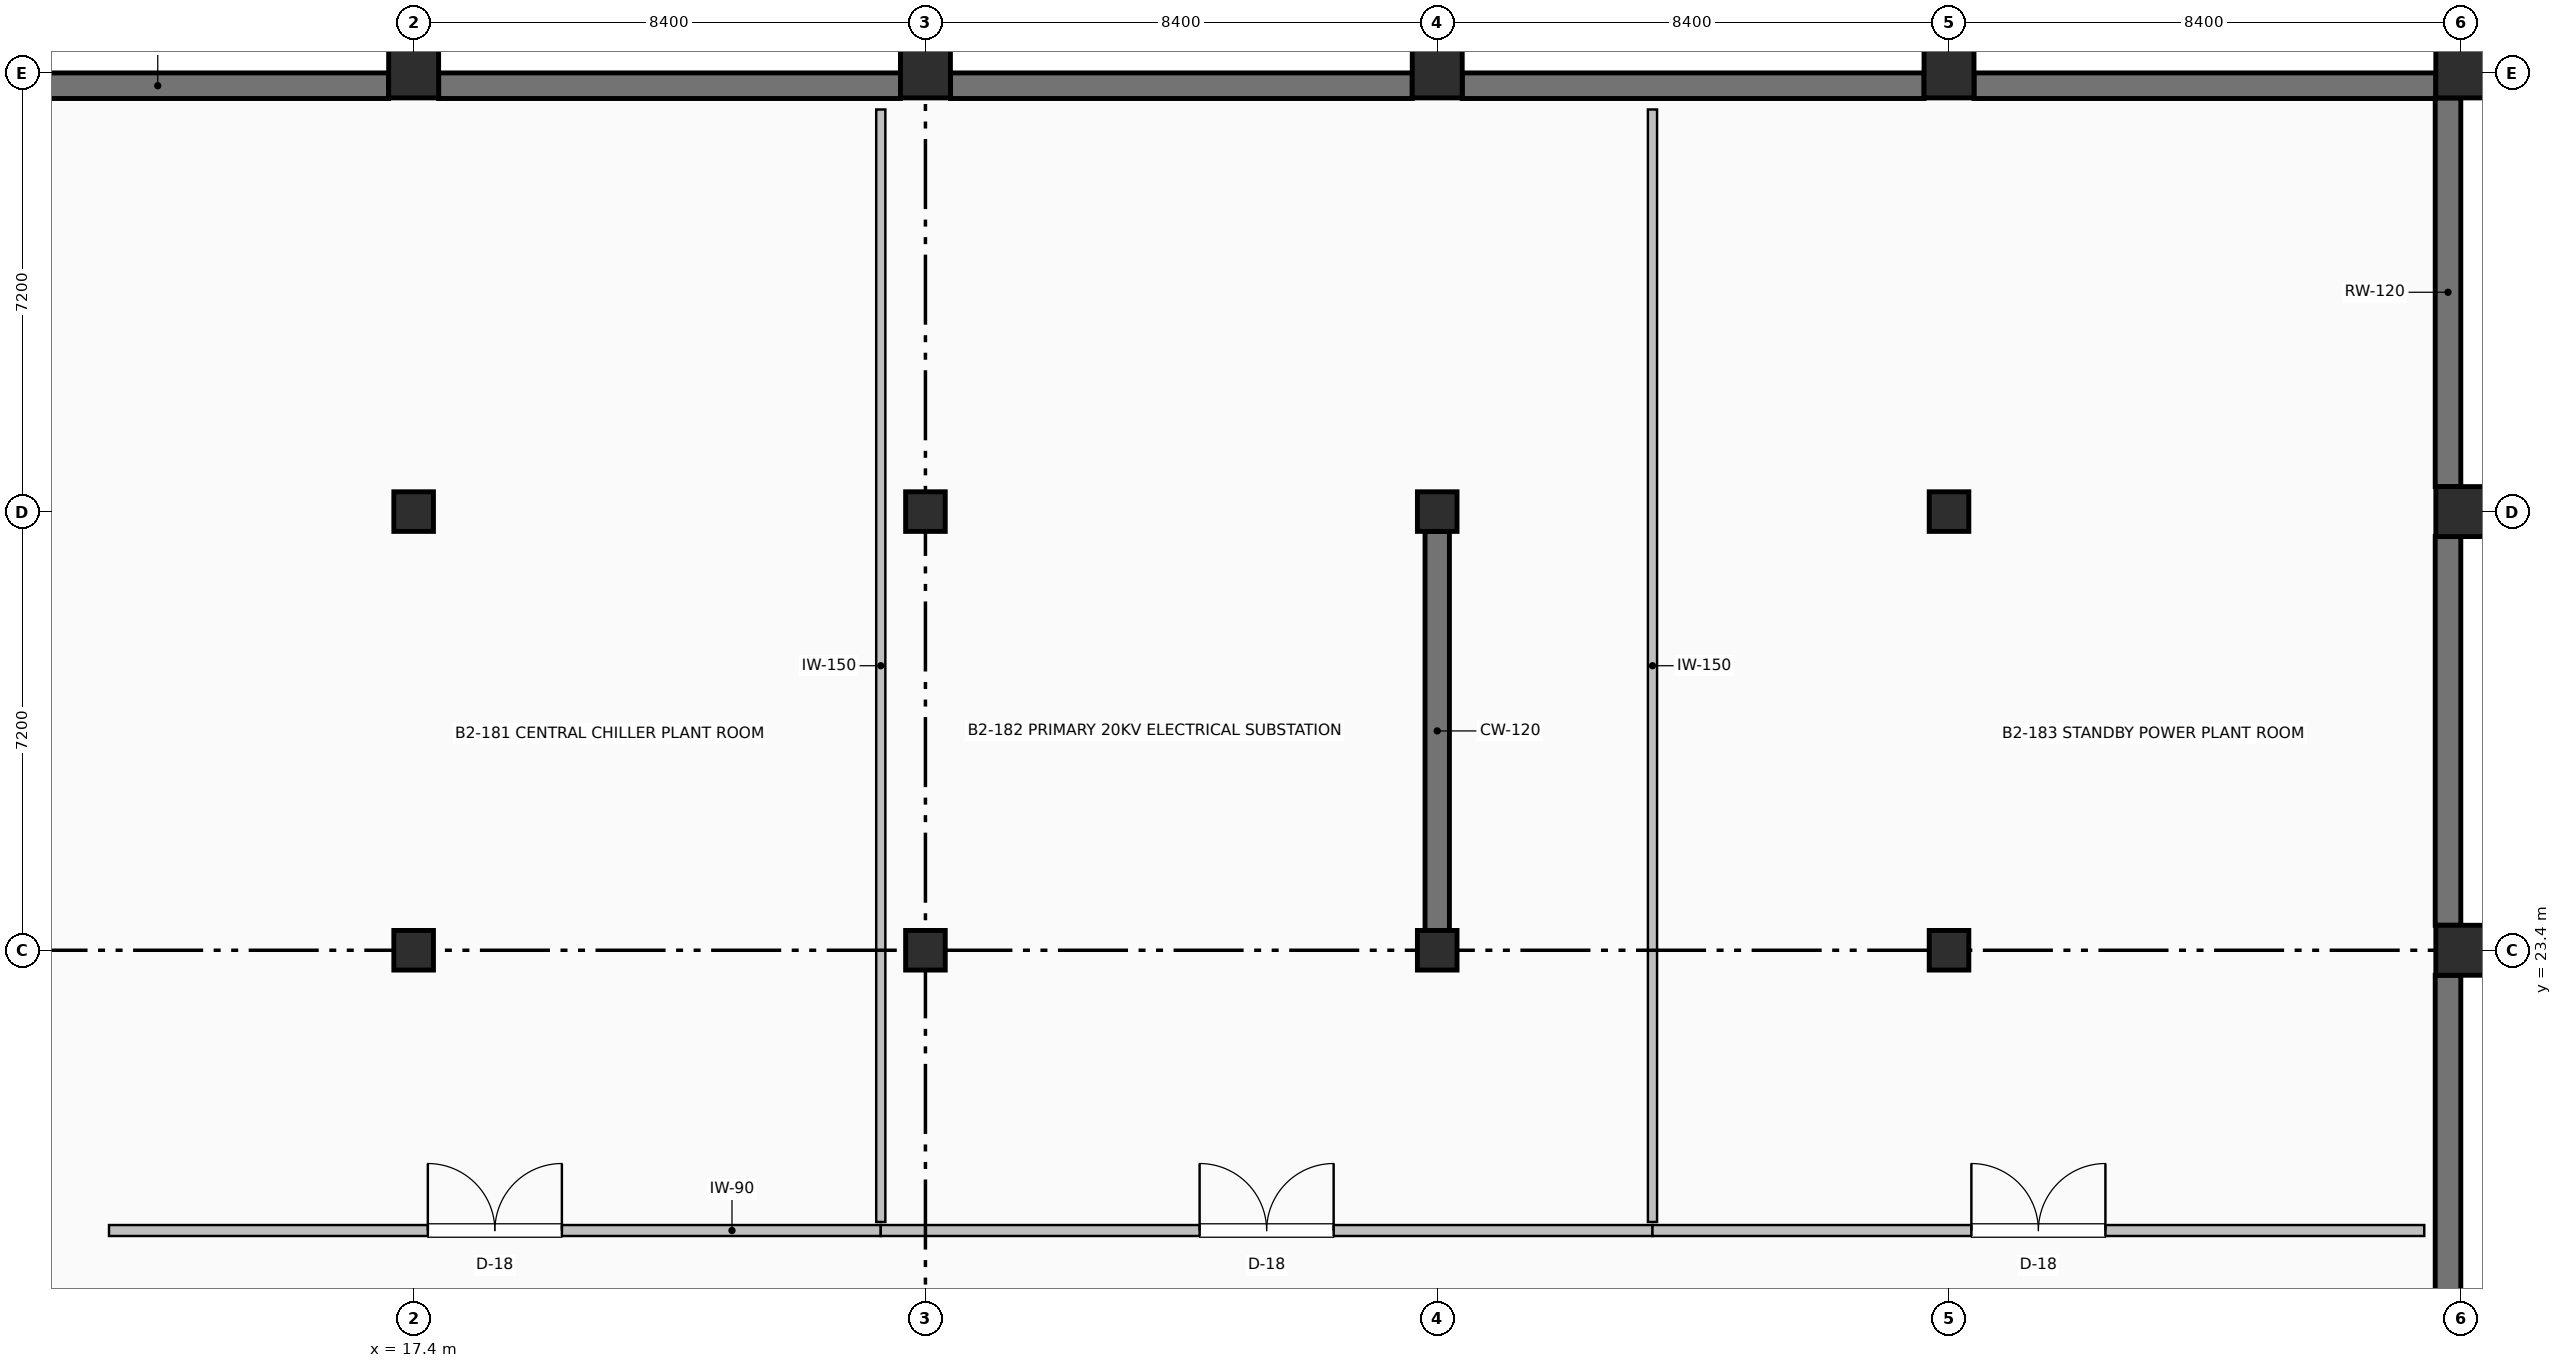
"""IFC4 building model, lengths in metres.
Left out: names, types, materials, properties, quantities, classifications, styles, units other than length and angle.
Written with IfcOpenShell. Run it as: python <this file> out.ifc"""

import sys

from ifc_helpers import new_model, si_unit, direction, frame, frame_2d, origin, origin_2d, place, context, subcontext, project, spatial, rectangle, extrude, element, fill, save


model = new_model("IFC4")
c1 = context("Model", 3, precision=1e-05, world=origin(), true_north=direction((0.0, 1.0)))
c2 = subcontext(c1, "Body", "Model", "MODEL_VIEW")
j1 = project(units=[si_unit("LENGTHUNIT", "METRE"), si_unit("PLANEANGLEUNIT", "RADIAN")], contexts=[c1])
p1 = place(None, origin())
s1 = spatial("IfcSite", under=j1, at=p1, CompositionType="ELEMENT")
p2 = place(p1, origin())
s2 = spatial("IfcBuilding", under=s1, at=p2, CompositionType="ELEMENT")
p3 = place(p2, frame((0.0, 0.0, -9.6)))
s3 = spatial("IfcBuildingStorey", under=s2, at=p3, CompositionType="ELEMENT", Elevation=-9.6)
for number, where, z_axis, x_axis in (
    (1, (17.4, 23.4, 0.0), (0.0, 0.0, 1.0), (1.0, 0.0, 0.0)),
    (2, (17.4, 30.6, 0.0), (0.0, 0.0, 1.0), (1.0, 0.0, 0.0)),
):
    element("IfcColumn", number, at=place(p3, frame(where, z_axis=z_axis, x_axis=x_axis)), inside=s3, PredefinedType="COLUMN", context=c2, shape_type="SweptSolid", body=[
        extrude(rectangle(XDim=0.65, YDim=0.65, at=origin_2d()), origin(), (0.0, 0.0, 1.0), 4.8),
    ])
p4 = place(p3, frame((17.4, 37.8, 0.0), z_axis=(0.0, 0.0, 1.0), x_axis=(1.0, 0.0, 0.0)))
e3 = element("IfcColumn", 3, at=p4, inside=s3, PredefinedType="COLUMN", context=c2, shape_type="SweptSolid", body=[
    extrude(rectangle(XDim=0.82, YDim=0.82, at=origin_2d()), origin(), (0.0, 0.0, 1.0), 4.8),
])
for number, where, z_axis, x_axis in (
    (4, (25.8, 23.4, 0.0), (0.0, 0.0, 1.0), (1.0, 0.0, 0.0)),
    (5, (25.8, 30.6, 0.0), (0.0, 0.0, 1.0), (1.0, 0.0, 0.0)),
):
    element("IfcColumn", number, at=place(p3, frame(where, z_axis=z_axis, x_axis=x_axis)), inside=s3, PredefinedType="COLUMN", context=c2, shape_type="SweptSolid", body=[
        extrude(rectangle(XDim=0.65, YDim=0.65, at=origin_2d()), origin(), (0.0, 0.0, 1.0), 4.8),
    ])
p5 = place(p3, frame((25.8, 37.8, 0.0), z_axis=(0.0, 0.0, 1.0), x_axis=(1.0, 0.0, 0.0)))
e6 = element("IfcColumn", 6, at=p5, inside=s3, PredefinedType="COLUMN", context=c2, shape_type="SweptSolid", body=[
    extrude(rectangle(XDim=0.82, YDim=0.82, at=origin_2d()), origin(), (0.0, 0.0, 1.0), 4.8),
])
for number, where, z_axis, x_axis in (
    (7, (34.2, 23.4, 0.0), (0.0, 0.0, 1.0), (1.0, 0.0, 0.0)),
    (8, (34.2, 30.6, 0.0), (0.0, 0.0, 1.0), (1.0, 0.0, 0.0)),
):
    element("IfcColumn", number, at=place(p3, frame(where, z_axis=z_axis, x_axis=x_axis)), inside=s3, PredefinedType="COLUMN", context=c2, shape_type="SweptSolid", body=[
        extrude(rectangle(XDim=0.65, YDim=0.65, at=origin_2d()), origin(), (0.0, 0.0, 1.0), 4.8),
    ])
p6 = place(p3, frame((34.2, 37.8, 0.0), z_axis=(0.0, 0.0, 1.0), x_axis=(1.0, 0.0, 0.0)))
e9 = element("IfcColumn", 9, at=p6, inside=s3, PredefinedType="COLUMN", context=c2, shape_type="SweptSolid", body=[
    extrude(rectangle(XDim=0.82, YDim=0.82, at=origin_2d()), origin(), (0.0, 0.0, 1.0), 4.8),
])
for number, where, z_axis, x_axis in (
    (10, (42.6, 23.4, 0.0), (0.0, 0.0, 1.0), (1.0, 0.0, 0.0)),
    (11, (42.6, 30.6, 0.0), (0.0, 0.0, 1.0), (1.0, 0.0, 0.0)),
):
    element("IfcColumn", number, at=place(p3, frame(where, z_axis=z_axis, x_axis=x_axis)), inside=s3, PredefinedType="COLUMN", context=c2, shape_type="SweptSolid", body=[
        extrude(rectangle(XDim=0.65, YDim=0.65, at=origin_2d()), origin(), (0.0, 0.0, 1.0), 4.8),
    ])
for number, where, z_axis, x_axis in (
    (12, (42.6, 37.8, 0.0), (0.0, 0.0, 1.0), (1.0, 0.0, 0.0)),
    (13, (51.0, 23.4, 0.0), (0.0, 0.0, 1.0), (1.0, 0.0, 0.0)),
    (14, (51.0, 30.6, 0.0), (0.0, 0.0, 1.0), (1.0, 0.0, 0.0)),
    (15, (51.0, 37.8, 0.0), (0.0, 0.0, 1.0), (1.0, 0.0, 0.0)),
):
    element("IfcColumn", number, at=place(p3, frame(where, z_axis=z_axis, x_axis=x_axis)), inside=s3, PredefinedType="COLUMN", context=c2, shape_type="SweptSolid", body=[
        extrude(rectangle(XDim=0.82, YDim=0.82, at=origin_2d()), origin(), (0.0, 0.0, 1.0), 4.8),
    ])
p7 = place(p3, frame((34.2, 23.725, 0.0), z_axis=(0.0, 0.0, 1.0), x_axis=(0.0, 1.0, 0.0)))
e16 = element("IfcWall", 16, at=p7, inside=s3, PredefinedType="SHEAR", context=c2, shape_type="SweptSolid", body=[
    extrude(rectangle(XDim=6.55, YDim=0.4, at=frame_2d((3.275, 0.0))), origin(), (0.0, 0.0, 1.0), 4.48),
])
p8 = place(p3, frame((9.41, 37.59, 0.0), z_axis=(0.0, 0.0, 1.0), x_axis=(1.0, 0.0, 0.0)))
e17 = element("IfcWall", 17, at=p8, inside=s3, PredefinedType="SHEAR", context=c2, shape_type="SweptSolid", body=[
    extrude(rectangle(XDim=7.58, YDim=0.42, at=frame_2d((3.79, 0.0))), origin(), (0.0, 0.0, 1.0), 4.5),
])
p9 = place(p3, frame((17.81, 37.59, 0.0), z_axis=(0.0, 0.0, 1.0), x_axis=(1.0, 0.0, 0.0)))
e18 = element("IfcWall", 18, at=p9, inside=s3, PredefinedType="SHEAR", context=c2, shape_type="SweptSolid", body=[
    extrude(rectangle(XDim=7.58, YDim=0.42, at=frame_2d((3.79, 0.0))), origin(), (0.0, 0.0, 1.0), 4.5),
])
p10 = place(p3, frame((26.21, 37.59, 0.0), z_axis=(0.0, 0.0, 1.0), x_axis=(1.0, 0.0, 0.0)))
e19 = element("IfcWall", 19, at=p10, inside=s3, PredefinedType="SHEAR", context=c2, shape_type="SweptSolid", body=[
    extrude(rectangle(XDim=7.58, YDim=0.42, at=frame_2d((3.79, 0.0))), origin(), (0.0, 0.0, 1.0), 4.5),
])
p11 = place(p3, frame((34.61, 37.59, 0.0), z_axis=(0.0, 0.0, 1.0), x_axis=(1.0, 0.0, 0.0)))
e20 = element("IfcWall", 20, at=p11, inside=s3, PredefinedType="SHEAR", context=c2, shape_type="SweptSolid", body=[
    extrude(rectangle(XDim=7.58, YDim=0.42, at=frame_2d((3.79, 0.0))), origin(), (0.0, 0.0, 1.0), 4.5),
])
p12 = place(p3, frame((43.01, 37.59, 0.0), z_axis=(0.0, 0.0, 1.0), x_axis=(1.0, 0.0, 0.0)))
e21 = element("IfcWall", 21, at=p12, inside=s3, PredefinedType="SHEAR", context=c2, shape_type="SweptSolid", body=[
    extrude(rectangle(XDim=7.58, YDim=0.42, at=frame_2d((3.79, 0.0))), origin(), (0.0, 0.0, 1.0), 4.5),
])
for number, where, z_axis, x_axis in (
    (22, (50.79, 37.39, 0.0), (0.0, 0.0, 1.0), (0.0, -1.0, 0.0)),
    (23, (50.79, 30.19, 0.0), (0.0, 0.0, 1.0), (0.0, -1.0, 0.0)),
    (24, (50.79, 22.99, 0.0), (0.0, 0.0, 1.0), (0.0, -1.0, 0.0)),
):
    element("IfcWall", number, at=place(p3, frame(where, z_axis=z_axis, x_axis=x_axis)), inside=s3, PredefinedType="SHEAR", context=c2, shape_type="SweptSolid", body=[
        extrude(rectangle(XDim=6.38, YDim=0.42, at=frame_2d((3.19, 0.0))), origin(), (0.0, 0.0, 1.0), 4.5),
    ])
p13 = place(p3, frame((12.4, 18.8, 0.0), z_axis=(0.0, 0.0, 1.0), x_axis=(1.0, 0.0, 0.0)))
e25 = element("IfcWall", 25, at=p13, inside=s3, PredefinedType="PARTITIONING", context=c2, shape_type="SweptSolid", body=[
    extrude(rectangle(XDim=12.667, YDim=0.18, at=frame_2d((6.333, 0.0))), origin(), (0.0, 0.0, 1.0), 4.492),
])
p14 = place(p13, frame((5.233, 0.0, 0.0)))
e26 = element("IfcOpeningElement", 26, at=p14, cuts=e25, PredefinedType="OPENING", context=c2, shape_type="SweptSolid", body=[
    extrude(rectangle(XDim=2.2, YDim=2.32, at=frame_2d((1.1, 1.16))), frame((0.0, 0.1, 0.0), z_axis=(0.0, -1.0, 0.0), x_axis=(1.0, 0.0, 0.0)), (0.0, 0.0, 1.0), 0.2),
])
p15 = place(p3, frame((25.067, 18.94, 0.0), z_axis=(0.0, 0.0, 1.0), x_axis=(0.0, 1.0, 0.0)))
e27 = element("IfcWall", 27, at=p15, inside=s3, PredefinedType="PARTITIONING", context=c2, shape_type="SweptSolid", body=[
    extrude(rectangle(XDim=18.26, YDim=0.15, at=frame_2d((9.13, 0.0))), origin(), (0.0, 0.0, 1.0), 4.492),
])
p16 = place(p3, frame((25.067, 18.8, 0.0), z_axis=(0.0, 0.0, 1.0), x_axis=(1.0, 0.0, 0.0)))
e28 = element("IfcWall", 28, at=p16, inside=s3, PredefinedType="PARTITIONING", context=c2, shape_type="SweptSolid", body=[
    extrude(rectangle(XDim=12.666, YDim=0.18, at=frame_2d((6.333, 0.0))), origin(), (0.0, 0.0, 1.0), 4.492),
])
p17 = place(p16, frame((5.233, 0.0, 0.0)))
e29 = element("IfcOpeningElement", 29, at=p17, cuts=e28, PredefinedType="OPENING", context=c2, shape_type="SweptSolid", body=[
    extrude(rectangle(XDim=2.2, YDim=2.32, at=frame_2d((1.1, 1.16))), frame((0.0, 0.1, 0.0), z_axis=(0.0, -1.0, 0.0), x_axis=(1.0, 0.0, 0.0)), (0.0, 0.0, 1.0), 0.2),
])
p18 = place(p3, frame((37.733, 18.94, 0.0), z_axis=(0.0, 0.0, 1.0), x_axis=(0.0, 1.0, 0.0)))
e30 = element("IfcWall", 30, at=p18, inside=s3, PredefinedType="PARTITIONING", context=c2, shape_type="SweptSolid", body=[
    extrude(rectangle(XDim=18.26, YDim=0.15, at=frame_2d((9.13, 0.0))), origin(), (0.0, 0.0, 1.0), 4.492),
])
p19 = place(p3, frame((37.733, 18.8, 0.0), z_axis=(0.0, 0.0, 1.0), x_axis=(1.0, 0.0, 0.0)))
e31 = element("IfcWall", 31, at=p19, inside=s3, PredefinedType="PARTITIONING", context=c2, shape_type="SweptSolid", body=[
    extrude(rectangle(XDim=12.667, YDim=0.18, at=frame_2d((6.333, 0.0))), origin(), (0.0, 0.0, 1.0), 4.492),
])
p20 = place(p19, frame((5.234, 0.0, 0.0)))
e32 = element("IfcOpeningElement", 32, at=p20, cuts=e31, PredefinedType="OPENING", context=c2, shape_type="SweptSolid", body=[
    extrude(rectangle(XDim=2.2, YDim=2.32, at=frame_2d((1.1, 1.16))), frame((0.0, 0.1, 0.0), z_axis=(0.0, -1.0, 0.0), x_axis=(1.0, 0.0, 0.0)), (0.0, 0.0, 1.0), 0.2),
])
p21 = place(p14, origin())
e33 = element("IfcDoor", 33, at=p21, inside=s3, OperationType="DOUBLE_DOOR_SINGLE_SWING", PredefinedType="DOOR", context=c2, shape_type="SweptSolid", body=[
    extrude(rectangle(XDim=2.2, YDim=2.32, at=frame_2d((1.1, 1.16))), frame((0.0, 0.025, 0.0), z_axis=(0.0, -1.0, 0.0), x_axis=(1.0, 0.0, 0.0)), (0.0, 0.0, 1.0), 0.05),
])
fill(e26, e33)
p22 = place(p17, origin())
e34 = element("IfcDoor", 34, at=p22, inside=s3, OperationType="DOUBLE_DOOR_SINGLE_SWING", PredefinedType="DOOR", context=c2, shape_type="SweptSolid", body=[
    extrude(rectangle(XDim=2.2, YDim=2.32, at=frame_2d((1.1, 1.16))), frame((0.0, 0.025, 0.0), z_axis=(0.0, -1.0, 0.0), x_axis=(1.0, 0.0, 0.0)), (0.0, 0.0, 1.0), 0.05),
])
fill(e29, e34)
p23 = place(p20, origin())
e35 = element("IfcDoor", 35, at=p23, inside=s3, OperationType="DOUBLE_DOOR_SINGLE_SWING", PredefinedType="DOOR", context=c2, shape_type="SweptSolid", body=[
    extrude(rectangle(XDim=2.2, YDim=2.32, at=frame_2d((1.1, 1.16))), frame((0.0, 0.025, 0.0), z_axis=(0.0, -1.0, 0.0), x_axis=(1.0, 0.0, 0.0)), (0.0, 0.0, 1.0), 0.05),
])
fill(e32, e35)
save(model, sys.argv[1])
